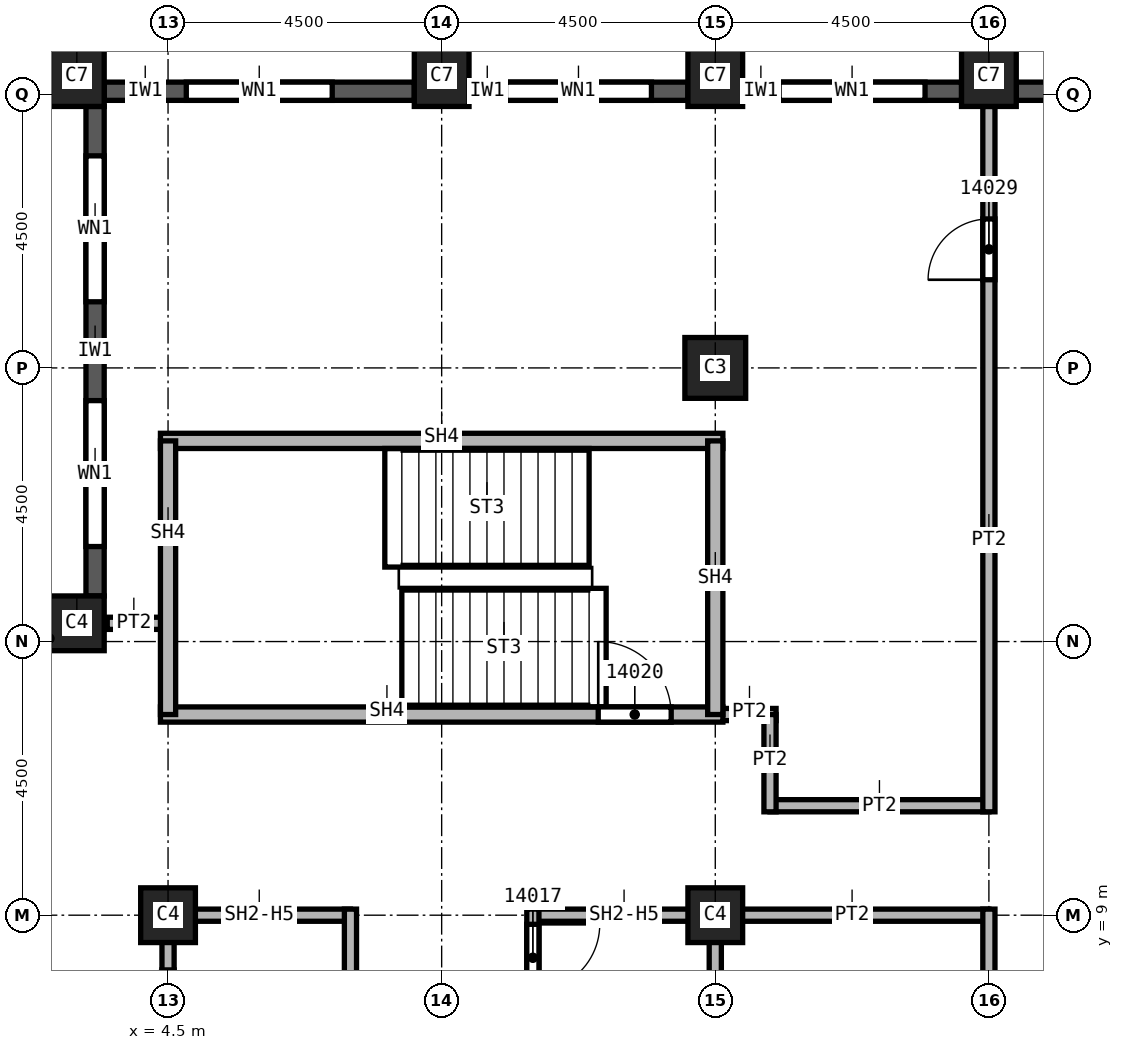
"""IFC4 building model, lengths in metres.
Left out: names, types, materials, properties, quantities, classifications, styles, units other than length and angle.
Written with IfcOpenShell. Run it as: python <this file> out.ifc"""

import sys

from ifc_helpers import new_model, si_unit, direction, frame, frame_2d, origin, origin_2d, place, context, subcontext, project, spatial, rectangle, extrude, element, fill, save


model = new_model("IFC4")
c1 = context("Model", 3, precision=1e-05, world=origin(), true_north=direction((0.0, 1.0)))
c2 = subcontext(c1, "Body", "Model", "MODEL_VIEW")
j1 = project(units=[si_unit("LENGTHUNIT", "METRE"), si_unit("PLANEANGLEUNIT", "RADIAN")], contexts=[c1])
p1 = place(None, origin())
s1 = spatial("IfcSite", under=j1, at=p1, CompositionType="ELEMENT")
p2 = place(p1, origin())
s2 = spatial("IfcBuilding", under=s1, at=p2, CompositionType="ELEMENT")
p3 = place(p2, frame((0.0, 0.0, 224.0)))
s3 = spatial("IfcBuildingStorey", under=s2, at=p3, CompositionType="ELEMENT", Elevation=224.0)
p4 = place(p3, frame((13.5, 18.0, 0.0), z_axis=(0.0, 0.0, 1.0), x_axis=(1.0, 0.0, 0.0)))
e1 = element("IfcColumn", 1, at=p4, inside=s3, PredefinedType="COLUMN", context=c2, shape_type="SweptSolid", body=[
    extrude(rectangle(XDim=1.0, YDim=1.0, at=origin_2d()), origin(), (0.0, 0.0, 1.0), 3.72),
])
for number, where, z_axis, x_axis in (
    (2, (4.5, 9.0, 0.0), (0.0, 0.0, 1.0), (1.0, 0.0, 0.0)),
    (3, (13.5, 9.0, 0.0), (0.0, 0.0, 1.0), (1.0, 0.0, 0.0)),
):
    element("IfcColumn", number, at=place(p3, frame(where, z_axis=z_axis, x_axis=x_axis)), inside=s3, PredefinedType="COLUMN", context=c2, shape_type="SweptSolid", body=[
        extrude(rectangle(XDim=0.9, YDim=0.9, at=origin_2d()), origin(), (0.0, 0.0, 1.0), 3.72),
    ])
for number, where, z_axis, x_axis in (
    (4, (3.0, 22.8, 0.0), (0.0, 0.0, 1.0), (1.0, 0.0, 0.0)),
    (5, (9.0, 22.8, 0.0), (0.0, 0.0, 1.0), (1.0, 0.0, 0.0)),
    (6, (13.5, 22.8, 0.0), (0.0, 0.0, 1.0), (1.0, 0.0, 0.0)),
    (7, (18.0, 22.8, 0.0), (0.0, 0.0, 1.0), (1.0, 0.0, 0.0)),
):
    element("IfcColumn", number, at=place(p3, frame(where, z_axis=z_axis, x_axis=x_axis)), inside=s3, PredefinedType="COLUMN", context=c2, shape_type="SweptSolid", body=[
        extrude(rectangle(XDim=0.9, YDim=1.0, at=origin_2d()), origin(), (0.0, 0.0, 1.0), 3.72),
    ])
p5 = place(p3, frame((3.0, 13.8, 0.0), z_axis=(0.0, 0.0, 1.0), x_axis=(1.0, 0.0, 0.0)))
e8 = element("IfcColumn", 8, at=p5, inside=s3, PredefinedType="COLUMN", context=c2, shape_type="SweptSolid", body=[
    extrude(rectangle(XDim=0.9, YDim=0.9, at=origin_2d()), origin(), (0.0, 0.0, 1.0), 3.72),
])
p6 = place(p3, frame((22.05, 22.55, 0.0), z_axis=(0.0, 0.0, 1.0), x_axis=(-1.0, 0.0, 0.0)))
e9 = element("IfcWall", 9, at=p6, inside=s3, PredefinedType="SOLIDWALL", context=c2, shape_type="SweptSolid", body=[
    extrude(rectangle(XDim=3.6, YDim=0.3, at=frame_2d((1.8, 0.0))), origin(), (0.0, 0.0, 1.0), 3.12),
])
p7 = place(p6, frame((0.775, 0.0, 0.8)))
e10 = element("IfcOpeningElement", 10, at=p7, cuts=e9, PredefinedType="OPENING", context=c2, shape_type="SweptSolid", body=[
    extrude(rectangle(XDim=1.0, YDim=1.95, at=frame_2d((0.5, 0.975))), frame((0.0, 0.15, 0.0), z_axis=(0.0, -1.0, 0.0), x_axis=(1.0, 0.0, 0.0)), (0.0, 0.0, 1.0), 0.3),
])
p8 = place(p6, frame((2.375, 0.0, 0.8)))
e11 = element("IfcOpeningElement", 11, at=p8, cuts=e9, PredefinedType="OPENING", context=c2, shape_type="SweptSolid", body=[
    extrude(rectangle(XDim=0.6, YDim=1.95, at=frame_2d((0.3, 0.975))), frame((0.0, 0.15, 0.0), z_axis=(0.0, -1.0, 0.0), x_axis=(1.0, 0.0, 0.0)), (0.0, 0.0, 1.0), 0.3),
])
p9 = place(p3, frame((17.55, 22.55, 0.0), z_axis=(0.0, 0.0, 1.0), x_axis=(-1.0, 0.0, 0.0)))
e12 = element("IfcWall", 12, at=p9, inside=s3, PredefinedType="SOLIDWALL", context=c2, shape_type="SweptSolid", body=[
    extrude(rectangle(XDim=3.6, YDim=0.3, at=frame_2d((1.8, 0.0))), origin(), (0.0, 0.0, 1.0), 3.12),
])
p10 = place(p9, frame((0.6, 0.0, 0.8)))
e13 = element("IfcOpeningElement", 13, at=p10, cuts=e12, PredefinedType="OPENING", context=c2, shape_type="SweptSolid", body=[
    extrude(rectangle(XDim=2.4, YDim=1.95, at=frame_2d((1.2, 0.975))), frame((0.0, 0.15, 0.0), z_axis=(0.0, -1.0, 0.0), x_axis=(1.0, 0.0, 0.0)), (0.0, 0.0, 1.0), 0.3),
])
p11 = place(p3, frame((13.05, 22.55, 0.0), z_axis=(0.0, 0.0, 1.0), x_axis=(-1.0, 0.0, 0.0)))
e14 = element("IfcWall", 14, at=p11, inside=s3, PredefinedType="SOLIDWALL", context=c2, shape_type="SweptSolid", body=[
    extrude(rectangle(XDim=3.6, YDim=0.3, at=frame_2d((1.8, 0.0))), origin(), (0.0, 0.0, 1.0), 3.12),
])
p12 = place(p11, frame((0.6, 0.0, 0.8)))
e15 = element("IfcOpeningElement", 15, at=p12, cuts=e14, PredefinedType="OPENING", context=c2, shape_type="SweptSolid", body=[
    extrude(rectangle(XDim=2.4, YDim=1.95, at=frame_2d((1.2, 0.975))), frame((0.0, 0.15, 0.0), z_axis=(0.0, -1.0, 0.0), x_axis=(1.0, 0.0, 0.0)), (0.0, 0.0, 1.0), 0.3),
])
p13 = place(p3, frame((8.55, 22.55, 0.0), z_axis=(0.0, 0.0, 1.0), x_axis=(-1.0, 0.0, 0.0)))
e16 = element("IfcWall", 16, at=p13, inside=s3, PredefinedType="SOLIDWALL", context=c2, shape_type="SweptSolid", body=[
    extrude(rectangle(XDim=5.1, YDim=0.3, at=frame_2d((2.55, 0.0))), origin(), (0.0, 0.0, 1.0), 3.12),
])
p14 = place(p13, frame((1.35, 0.0, 0.8)))
e17 = element("IfcOpeningElement", 17, at=p14, cuts=e16, PredefinedType="OPENING", context=c2, shape_type="SweptSolid", body=[
    extrude(rectangle(XDim=2.4, YDim=1.95, at=frame_2d((1.2, 0.975))), frame((0.0, 0.15, 0.0), z_axis=(0.0, -1.0, 0.0), x_axis=(1.0, 0.0, 0.0)), (0.0, 0.0, 1.0), 0.3),
])
p15 = place(p3, frame((3.3, 22.3, 0.0), z_axis=(0.0, 0.0, 1.0), x_axis=(0.0, -1.0, 0.0)))
e18 = element("IfcWall", 18, at=p15, inside=s3, PredefinedType="SOLIDWALL", context=c2, shape_type="SweptSolid", body=[
    extrude(rectangle(XDim=8.05, YDim=0.3, at=frame_2d((4.025, 0.0))), origin(), (0.0, 0.0, 1.0), 3.12),
])
p16 = place(p15, frame((0.812, 0.0, 0.8)))
e19 = element("IfcOpeningElement", 19, at=p16, cuts=e18, PredefinedType="OPENING", context=c2, shape_type="SweptSolid", body=[
    extrude(rectangle(XDim=2.4, YDim=1.95, at=frame_2d((1.2, 0.975))), frame((0.0, 0.15, 0.0), z_axis=(0.0, -1.0, 0.0), x_axis=(1.0, 0.0, 0.0)), (0.0, 0.0, 1.0), 0.3),
])
p17 = place(p15, frame((4.837, 0.0, 0.8)))
e20 = element("IfcOpeningElement", 20, at=p17, cuts=e18, PredefinedType="OPENING", context=c2, shape_type="SweptSolid", body=[
    extrude(rectangle(XDim=2.4, YDim=1.95, at=frame_2d((1.2, 0.975))), frame((0.0, 0.15, 0.0), z_axis=(0.0, -1.0, 0.0), x_axis=(1.0, 0.0, 0.0)), (0.0, 0.0, 1.0), 0.3),
])
p18 = place(p3, frame((3.5, 13.8, 0.0), z_axis=(0.0, 0.0, 1.0), x_axis=(1.0, 0.0, 0.0)))
e21 = element("IfcWall", 21, at=p18, inside=s3, PredefinedType="PARTITIONING", context=c2, shape_type="SweptSolid", body=[
    extrude(rectangle(XDim=1.0, YDim=0.2, at=frame_2d((0.5, 0.0))), origin(), (0.0, 0.0, 1.0), 3.72),
])
p19 = place(p3, frame((13.375, 12.3, 0.0), z_axis=(0.0, 0.0, 1.0), x_axis=(1.0, 0.0, 0.0)))
e22 = element("IfcWall", 22, at=p19, inside=s3, PredefinedType="PARTITIONING", context=c2, shape_type="SweptSolid", body=[
    extrude(rectangle(XDim=1.125, YDim=0.2, at=frame_2d((0.562, 0.0))), origin(), (0.0, 0.0, 1.0), 3.72),
])
p20 = place(p3, frame((18.0, 9.0, 0.0), z_axis=(0.0, 0.0, 1.0), x_axis=(-1.0, 0.0, 0.0)))
e23 = element("IfcWall", 23, at=p20, inside=s3, PredefinedType="PARTITIONING", context=c2, shape_type="SweptSolid", body=[
    extrude(rectangle(XDim=4.5, YDim=0.2, at=frame_2d((2.25, 0.0))), origin(), (0.0, 0.0, 1.0), 3.72),
])
p21 = place(p3, frame((14.4, 10.8, 0.0), z_axis=(0.0, 0.0, 1.0), x_axis=(1.0, 0.0, 0.0)))
e24 = element("IfcWall", 24, at=p21, inside=s3, PredefinedType="PARTITIONING", context=c2, shape_type="SweptSolid", body=[
    extrude(rectangle(XDim=3.6, YDim=0.2, at=frame_2d((1.8, 0.0))), origin(), (0.0, 0.0, 1.0), 3.72),
])
p22 = place(p3, frame((14.4, 12.3, 0.0), z_axis=(0.0, 0.0, 1.0), x_axis=(0.0, -1.0, 0.0)))
e25 = element("IfcWall", 25, at=p22, inside=s3, PredefinedType="PARTITIONING", context=c2, shape_type="SweptSolid", body=[
    extrude(rectangle(XDim=1.6, YDim=0.2, at=frame_2d((0.8, 0.0))), origin(), (0.0, 0.0, 1.0), 3.72),
])
p23 = place(p3, frame((18.0, -9.1, 0.0), z_axis=(0.0, 0.0, 1.0), x_axis=(0.0, 1.0, 0.0)))
e26 = element("IfcWall", 26, at=p23, inside=s3, PredefinedType="PARTITIONING", context=c2, shape_type="SweptSolid", body=[
    extrude(rectangle(XDim=18.2, YDim=0.2, at=frame_2d((9.1, 0.0))), origin(), (0.0, 0.0, 1.0), 3.72),
])
p24 = place(p23, frame((4.3, 0.0, 0.0)))
e27 = element("IfcOpeningElement", 27, at=p24, cuts=e26, PredefinedType="OPENING", context=c2, shape_type="SweptSolid", body=[
    extrude(rectangle(XDim=1.0, YDim=2.1, at=frame_2d((0.5, 1.05))), frame((0.0, 0.1, 0.0), z_axis=(0.0, -1.0, 0.0), x_axis=(1.0, 0.0, 0.0)), (0.0, 0.0, 1.0), 0.2),
])
p25 = place(p23, frame((12.4, 0.0, 0.0)))
e28 = element("IfcOpeningElement", 28, at=p25, cuts=e26, PredefinedType="OPENING", context=c2, shape_type="SweptSolid", body=[
    extrude(rectangle(XDim=1.0, YDim=2.1, at=frame_2d((0.5, 1.05))), frame((0.0, 0.1, 0.0), z_axis=(0.0, -1.0, 0.0), x_axis=(1.0, 0.0, 0.0)), (0.0, 0.0, 1.0), 0.2),
])
p26 = place(p3, frame((18.0, 10.7, 0.0), z_axis=(0.0, 0.0, 1.0), x_axis=(0.0, 1.0, 0.0)))
e29 = element("IfcWall", 29, at=p26, inside=s3, PredefinedType="PARTITIONING", context=c2, shape_type="SweptSolid", body=[
    extrude(rectangle(XDim=11.6, YDim=0.2, at=frame_2d((5.8, 0.0))), origin(), (0.0, 0.0, 1.0), 3.72),
])
p27 = place(p26, frame((8.75, 0.0, 0.0)))
e30 = element("IfcOpeningElement", 30, at=p27, cuts=e29, PredefinedType="OPENING", context=c2, shape_type="SweptSolid", body=[
    extrude(rectangle(XDim=1.0, YDim=2.1, at=frame_2d((0.5, 1.05))), frame((0.0, 0.1, 0.0), z_axis=(0.0, -1.0, 0.0), x_axis=(1.0, 0.0, 0.0)), (0.0, 0.0, 1.0), 0.2),
])
p28 = place(p3, frame((4.5, 0.0, 0.0), z_axis=(0.0, 0.0, 1.0), x_axis=(0.0, 1.0, 0.0)))
e31 = element("IfcWall", 31, at=p28, inside=s3, PredefinedType="SOLIDWALL", context=c2, shape_type="SweptSolid", body=[
    extrude(rectangle(XDim=9.1, YDim=0.2, at=frame_2d((4.55, 0.0))), origin(), (0.0, 0.0, 1.0), 2.958),
])
p29 = place(p28, frame((3.4, 0.0, 0.0)))
e32 = element("IfcOpeningElement", 32, at=p29, cuts=e31, PredefinedType="OPENING", context=c2, shape_type="SweptSolid", body=[
    extrude(rectangle(XDim=1.1, YDim=2.1, at=frame_2d((0.55, 1.05))), frame((0.0, 0.1, 0.0), z_axis=(0.0, -1.0, 0.0), x_axis=(1.0, 0.0, 0.0)), (0.0, 0.0, 1.0), 0.2),
])
p30 = place(p28, frame((7.0, 0.0, 0.0)))
e33 = element("IfcOpeningElement", 33, at=p30, cuts=e31, PredefinedType="OPENING", context=c2, shape_type="SweptSolid", body=[
    extrude(rectangle(XDim=1.1, YDim=2.1, at=frame_2d((0.55, 1.05))), frame((0.0, 0.1, 0.0), z_axis=(0.0, -1.0, 0.0), x_axis=(1.0, 0.0, 0.0)), (0.0, 0.0, 1.0), 0.2),
])
p31 = place(p3, frame((4.5, 9.0, 0.0), z_axis=(0.0, 0.0, 1.0), x_axis=(1.0, 0.0, 0.0)))
e34 = element("IfcWall", 34, at=p31, inside=s3, PredefinedType="SOLIDWALL", context=c2, shape_type="SweptSolid", body=[
    extrude(rectangle(XDim=3.0, YDim=0.2, at=frame_2d((1.5, 0.0))), origin(), (0.0, 0.0, 1.0), 2.958),
])
p32 = place(p3, frame((7.5, 9.1, 0.0), z_axis=(0.0, 0.0, 1.0), x_axis=(0.0, -1.0, 0.0)))
e35 = element("IfcWall", 35, at=p32, inside=s3, PredefinedType="SOLIDWALL", context=c2, shape_type="SweptSolid", body=[
    extrude(rectangle(XDim=6.225, YDim=0.2, at=frame_2d((3.113, 0.0))), origin(), (0.0, 0.0, 1.0), 3.72),
])
p33 = place(p3, frame((10.5, 9.0, 0.0), z_axis=(0.0, 0.0, 1.0), x_axis=(1.0, 0.0, 0.0)))
e36 = element("IfcWall", 36, at=p33, inside=s3, PredefinedType="SOLIDWALL", context=c2, shape_type="SweptSolid", body=[
    extrude(rectangle(XDim=3.1, YDim=0.2, at=frame_2d((1.55, 0.0))), origin(), (0.0, 0.0, 1.0), 2.958),
])
p34 = place(p3, frame((10.5, 9.1, 0.0), z_axis=(0.0, 0.0, 1.0), x_axis=(0.0, -1.0, 0.0)))
e37 = element("IfcWall", 37, at=p34, inside=s3, PredefinedType="SOLIDWALL", context=c2, shape_type="SweptSolid", body=[
    extrude(rectangle(XDim=3.225, YDim=0.2, at=frame_2d((1.613, 0.0))), origin(), (0.0, 0.0, 1.0), 3.72),
])
p35 = place(p34, frame((0.25, 0.0, 0.0)))
e38 = element("IfcOpeningElement", 38, at=p35, cuts=e37, PredefinedType="OPENING", context=c2, shape_type="SweptSolid", body=[
    extrude(rectangle(XDim=1.1, YDim=2.1, at=frame_2d((0.55, 1.05))), frame((0.0, 0.1, 0.0), z_axis=(0.0, -1.0, 0.0), x_axis=(1.0, 0.0, 0.0)), (0.0, 0.0, 1.0), 0.2),
])
p36 = place(p3, frame((13.5, 9.1, 0.0), z_axis=(0.0, 0.0, 1.0), x_axis=(0.0, -1.0, 0.0)))
e39 = element("IfcWall", 39, at=p36, inside=s3, PredefinedType="SOLIDWALL", context=c2, shape_type="SweptSolid", body=[
    extrude(rectangle(XDim=3.1, YDim=0.2, at=frame_2d((1.55, 0.0))), origin(), (0.0, 0.0, 1.0), 2.958),
])
p37 = place(p3, frame((4.375, 12.3, 0.0), z_axis=(0.0, 0.0, 1.0), x_axis=(1.0, 0.0, 0.0)))
e40 = element("IfcWall", 40, at=p37, inside=s3, PredefinedType="SOLIDWALL", context=c2, shape_type="SweptSolid", body=[
    extrude(rectangle(XDim=9.25, YDim=0.25, at=frame_2d((4.625, 0.0))), origin(), (0.0, 0.0, 1.0), 3.72),
])
p38 = place(p37, frame((7.2, 0.0, 0.0)))
e41 = element("IfcOpeningElement", 41, at=p38, cuts=e40, PredefinedType="OPENING", context=c2, shape_type="SweptSolid", body=[
    extrude(rectangle(XDim=1.2, YDim=2.1, at=frame_2d((0.6, 1.05))), frame((0.0, 0.125, 0.0), z_axis=(0.0, -1.0, 0.0), x_axis=(1.0, 0.0, 0.0)), (0.0, 0.0, 1.0), 0.25),
])
p39 = place(p3, frame((4.375, 16.8, 0.0), z_axis=(0.0, 0.0, 1.0), x_axis=(1.0, 0.0, 0.0)))
e42 = element("IfcWall", 42, at=p39, inside=s3, PredefinedType="SOLIDWALL", context=c2, shape_type="SweptSolid", body=[
    extrude(rectangle(XDim=9.25, YDim=0.25, at=frame_2d((4.625, 0.0))), origin(), (0.0, 0.0, 1.0), 3.72),
])
for number, where, z_axis, x_axis in (
    (43, (4.5, 12.3, 0.0), (0.0, 0.0, 1.0), (0.0, 1.0, 0.0)),
    (44, (13.5, 16.8, 0.0), (0.0, 0.0, 1.0), (0.0, -1.0, 0.0)),
):
    element("IfcWall", number, at=place(p3, frame(where, z_axis=z_axis, x_axis=x_axis)), inside=s3, PredefinedType="SOLIDWALL", context=c2, shape_type="SweptSolid", body=[
        extrude(rectangle(XDim=4.5, YDim=0.25, at=frame_2d((2.25, 0.0))), origin(), (0.0, 0.0, 1.0), 3.72),
    ])
p40 = place(p10, origin())
e45 = element("IfcWindow", 45, at=p40, inside=s3, PartitioningType="SINGLE_PANEL", PredefinedType="WINDOW", context=c2, shape_type="SweptSolid", body=[
    extrude(rectangle(XDim=2.4, YDim=1.95, at=frame_2d((1.2, 0.975))), frame((0.0, 0.03, 0.0), z_axis=(0.0, -1.0, 0.0), x_axis=(1.0, 0.0, 0.0)), (0.0, 0.0, 1.0), 0.06),
])
fill(e13, e45)
p41 = place(p12, origin())
e46 = element("IfcWindow", 46, at=p41, inside=s3, PartitioningType="SINGLE_PANEL", PredefinedType="WINDOW", context=c2, shape_type="SweptSolid", body=[
    extrude(rectangle(XDim=2.4, YDim=1.95, at=frame_2d((1.2, 0.975))), frame((0.0, 0.03, 0.0), z_axis=(0.0, -1.0, 0.0), x_axis=(1.0, 0.0, 0.0)), (0.0, 0.0, 1.0), 0.06),
])
fill(e15, e46)
p42 = place(p14, origin())
e47 = element("IfcWindow", 47, at=p42, inside=s3, PartitioningType="SINGLE_PANEL", PredefinedType="WINDOW", context=c2, shape_type="SweptSolid", body=[
    extrude(rectangle(XDim=2.4, YDim=1.95, at=frame_2d((1.2, 0.975))), frame((0.0, 0.03, 0.0), z_axis=(0.0, -1.0, 0.0), x_axis=(1.0, 0.0, 0.0)), (0.0, 0.0, 1.0), 0.06),
])
fill(e17, e47)
p43 = place(p16, origin())
e48 = element("IfcWindow", 48, at=p43, inside=s3, PartitioningType="SINGLE_PANEL", PredefinedType="WINDOW", context=c2, shape_type="SweptSolid", body=[
    extrude(rectangle(XDim=2.4, YDim=1.95, at=frame_2d((1.2, 0.975))), frame((0.0, 0.03, 0.0), z_axis=(0.0, -1.0, 0.0), x_axis=(1.0, 0.0, 0.0)), (0.0, 0.0, 1.0), 0.06),
])
fill(e19, e48)
p44 = place(p17, origin())
e49 = element("IfcWindow", 49, at=p44, inside=s3, PartitioningType="SINGLE_PANEL", PredefinedType="WINDOW", context=c2, shape_type="SweptSolid", body=[
    extrude(rectangle(XDim=2.4, YDim=1.95, at=frame_2d((1.2, 0.975))), frame((0.0, 0.03, 0.0), z_axis=(0.0, -1.0, 0.0), x_axis=(1.0, 0.0, 0.0)), (0.0, 0.0, 1.0), 0.06),
])
fill(e20, e49)
p45 = place(p35, origin())
e50 = element("IfcDoor", 50, at=p45, inside=s3, OperationType="SINGLE_SWING_RIGHT", PredefinedType="DOOR", context=c2, shape_type="SweptSolid", body=[
    extrude(rectangle(XDim=1.1, YDim=2.1, at=frame_2d((0.55, 1.05))), frame((0.0, 0.025, 0.0), z_axis=(0.0, -1.0, 0.0), x_axis=(1.0, 0.0, 0.0)), (0.0, 0.0, 1.0), 0.05),
])
fill(e38, e50)
p46 = place(p38, origin())
e51 = element("IfcDoor", 51, at=p46, inside=s3, OperationType="SINGLE_SWING_LEFT", PredefinedType="DOOR", context=c2, shape_type="SweptSolid", body=[
    extrude(rectangle(XDim=1.2, YDim=2.1, at=frame_2d((0.6, 1.05))), frame((0.0, 0.025, 0.0), z_axis=(0.0, -1.0, 0.0), x_axis=(1.0, 0.0, 0.0)), (0.0, 0.0, 1.0), 0.05),
])
fill(e41, e51)
p47 = place(p27, origin())
e52 = element("IfcDoor", 52, at=p47, inside=s3, OperationType="SINGLE_SWING_RIGHT", PredefinedType="DOOR", context=c2, shape_type="SweptSolid", body=[
    extrude(rectangle(XDim=1.0, YDim=2.1, at=frame_2d((0.5, 1.05))), frame((0.0, 0.025, 0.0), z_axis=(0.0, -1.0, 0.0), x_axis=(1.0, 0.0, 0.0)), (0.0, 0.0, 1.0), 0.05),
])
fill(e30, e52)
save(model, sys.argv[1])
